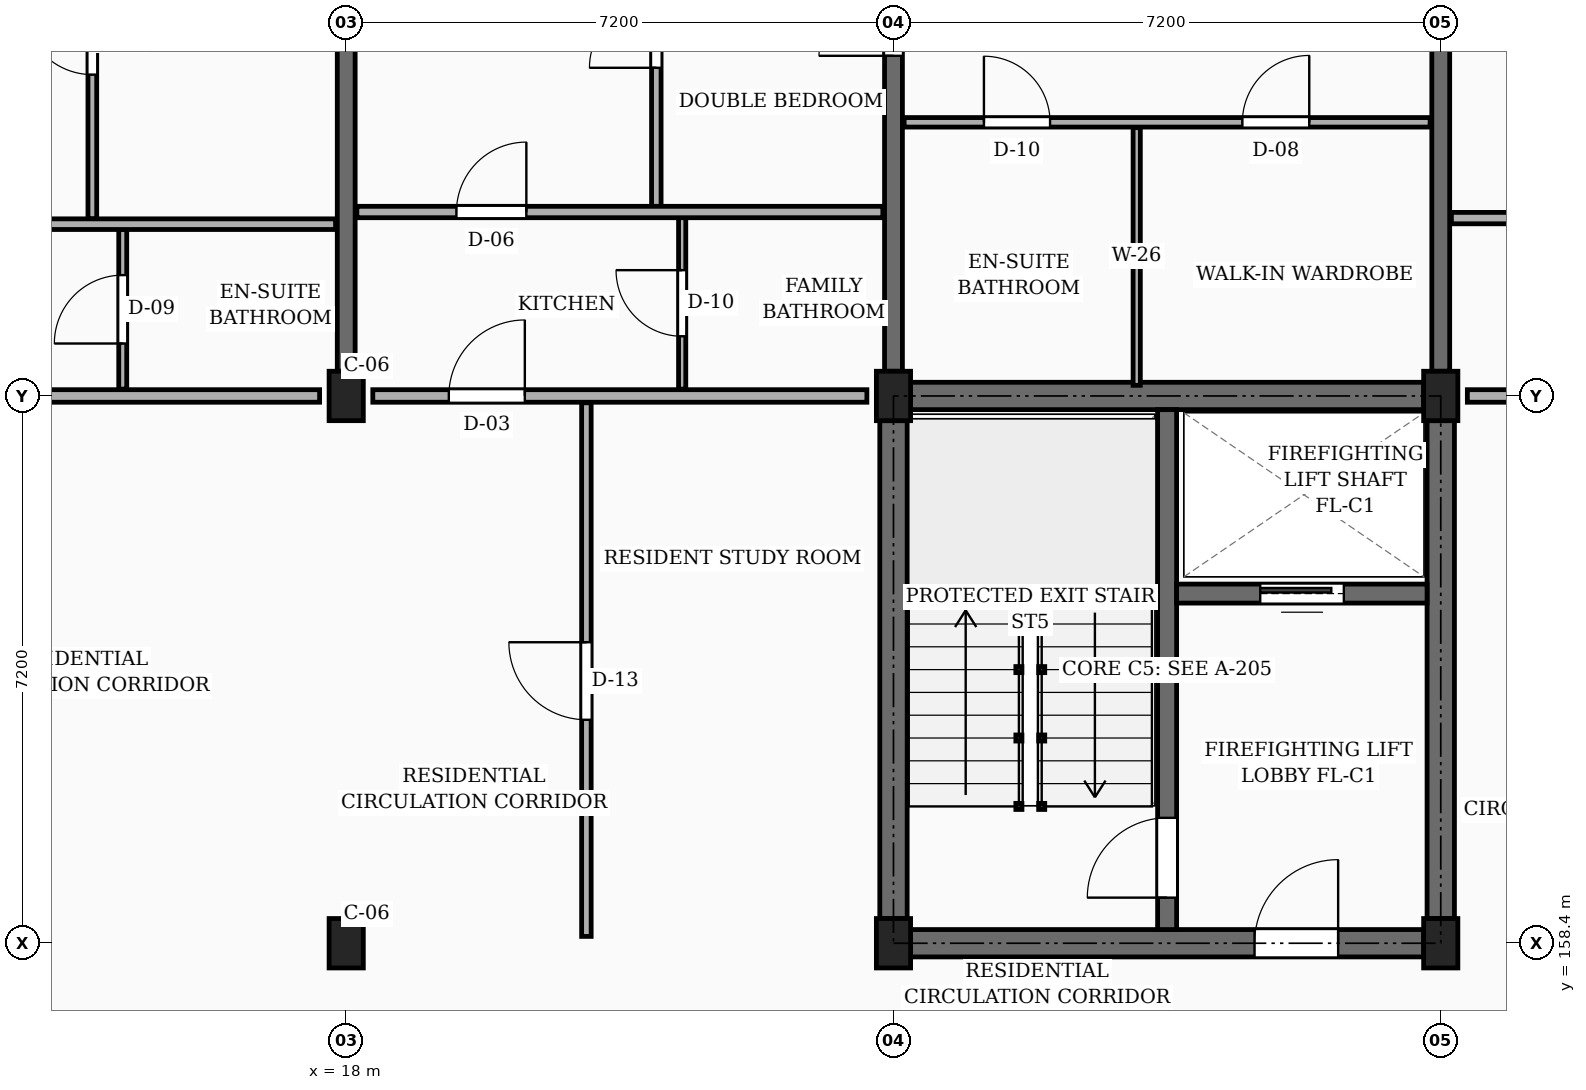
"""IFC4 building model, lengths in metres.
Left out: names, types, materials, properties, quantities, classifications, styles, units other than length and angle.
Written with IfcOpenShell. Run it as: python <this file> out.ifc"""

import sys

from ifc_helpers import new_model, si_unit, direction, frame, frame_2d, origin, origin_2d, place, context, subcontext, project, spatial, rectangle, extrude, element, fill, save


model = new_model("IFC4")
c1 = context("Model", 3, precision=1e-05, world=origin(), true_north=direction((0.0, 1.0)))
c2 = subcontext(c1, "Body", "Model", "MODEL_VIEW")
j1 = project(units=[si_unit("LENGTHUNIT", "METRE"), si_unit("PLANEANGLEUNIT", "RADIAN")], contexts=[c1])
p1 = place(None, origin())
s1 = spatial("IfcSite", under=j1, at=p1, CompositionType="ELEMENT")
p2 = place(p1, origin())
s2 = spatial("IfcBuilding", under=s1, at=p2, CompositionType="ELEMENT")
p3 = place(p2, frame((0.0, 0.0, 13.95)))
s3 = spatial("IfcBuildingStorey", under=s2, at=p3, CompositionType="ELEMENT", Elevation=13.95)
for number, where, z_axis, x_axis in (
    (1, (18.0, 158.4, 0.0), (0.0, 0.0, 1.0), (1.0, 0.0, 0.0)),
    (2, (18.0, 165.6, 0.0), (0.0, 0.0, 1.0), (1.0, 0.0, 0.0)),
    (3, (25.2, 158.4, 0.0), (0.0, 0.0, 1.0), (1.0, 0.0, 0.0)),
    (4, (25.2, 165.6, 0.0), (0.0, 0.0, 1.0), (1.0, 0.0, 0.0)),
    (5, (32.4, 158.4, 0.0), (0.0, 0.0, 1.0), (1.0, 0.0, 0.0)),
    (6, (32.4, 165.6, 0.0), (0.0, 0.0, 1.0), (1.0, 0.0, 0.0)),
):
    element("IfcColumn", number, at=place(p3, frame(where, z_axis=z_axis, x_axis=x_axis)), inside=s3, PredefinedType="COLUMN", context=c2, shape_type="SweptSolid", body=[
        extrude(rectangle(XDim=0.45, YDim=0.65, at=origin_2d()), origin(), (0.0, 0.0, 1.0), 3.15),
    ])
p4 = place(p3, frame((18.0, 165.925, 0.0), z_axis=(0.0, 0.0, 1.0), x_axis=(0.0, 1.0, 0.0)))
e7 = element("IfcWall", 7, at=p4, inside=s3, PredefinedType="SOLIDWALL", context=c2, shape_type="SweptSolid", body=[
    extrude(rectangle(XDim=6.6, YDim=0.235, at=frame_2d((3.3, 0.0))), origin(), (0.0, 0.0, 1.0), 2.185),
])
p5 = place(p3, frame((25.2, 165.925, 0.0), z_axis=(0.0, 0.0, 1.0), x_axis=(0.0, 1.0, 0.0)))
e8 = element("IfcWall", 8, at=p5, inside=s3, PredefinedType="SOLIDWALL", context=c2, shape_type="SweptSolid", body=[
    extrude(rectangle(XDim=6.6, YDim=0.235, at=frame_2d((3.3, 0.0))), origin(), (0.0, 0.0, 1.0), 2.185),
])
p6 = place(p5, frame((4.15, 0.0, 0.0)))
e9 = element("IfcOpeningElement", 9, at=p6, cuts=e8, PredefinedType="OPENING", context=c2, shape_type="SweptSolid", body=[
    extrude(rectangle(XDim=0.98, YDim=2.12, at=frame_2d((0.49, 1.06))), frame((0.0, 0.127, 0.0), z_axis=(0.0, -1.0, 0.0), x_axis=(1.0, 0.0, 0.0)), (0.0, 0.0, 1.0), 0.255),
])
p7 = place(p3, frame((32.4, 165.925, 0.0), z_axis=(0.0, 0.0, 1.0), x_axis=(0.0, 1.0, 0.0)))
e10 = element("IfcWall", 10, at=p7, inside=s3, PredefinedType="SOLIDWALL", context=c2, shape_type="SweptSolid", body=[
    extrude(rectangle(XDim=6.6, YDim=0.235, at=frame_2d((3.3, 0.0))), origin(), (0.0, 0.0, 1.0), 2.185),
])
p8 = place(p3, frame((25.2, 158.725, 0.0), z_axis=(0.0, 0.0, 1.0), x_axis=(0.0, 1.0, 0.0)))
e11 = element("IfcWall", 11, at=p8, inside=s3, PredefinedType="SHEAR", context=c2, shape_type="SweptSolid", body=[
    extrude(rectangle(XDim=6.55, YDim=0.36, at=frame_2d((3.275, 0.0))), origin(), (0.0, 0.0, 1.0), 2.885),
])
p9 = place(p3, frame((25.425, 165.6, 0.0), z_axis=(0.0, 0.0, 1.0), x_axis=(1.0, 0.0, 0.0)))
e12 = element("IfcWall", 12, at=p9, inside=s3, PredefinedType="SHEAR", context=c2, shape_type="SweptSolid", body=[
    extrude(rectangle(XDim=6.75, YDim=0.36, at=frame_2d((3.375, 0.0))), origin(), (0.0, 0.0, 1.0), 2.885),
])
p10 = place(p3, frame((32.4, 158.725, 0.0), z_axis=(0.0, 0.0, 1.0), x_axis=(0.0, 1.0, 0.0)))
e13 = element("IfcWall", 13, at=p10, inside=s3, PredefinedType="SHEAR", context=c2, shape_type="SweptSolid", body=[
    extrude(rectangle(XDim=6.55, YDim=0.36, at=frame_2d((3.275, 0.0))), origin(), (0.0, 0.0, 1.0), 2.885),
])
p11 = place(p3, frame((25.425, 158.4, 0.0), z_axis=(0.0, 0.0, 1.0), x_axis=(1.0, 0.0, 0.0)))
e14 = element("IfcWall", 14, at=p11, inside=s3, PredefinedType="SHEAR", context=c2, shape_type="SweptSolid", body=[
    extrude(rectangle(XDim=6.75, YDim=0.36, at=frame_2d((3.375, 0.0))), origin(), (0.0, 0.0, 1.0), 2.885),
])
p12 = place(p11, frame((4.525, 0.0, 0.0)))
e15 = element("IfcOpeningElement", 15, at=p12, cuts=e14, PredefinedType="OPENING", context=c2, shape_type="SweptSolid", body=[
    extrude(rectangle(XDim=1.1, YDim=2.15, at=frame_2d((0.55, 1.075))), frame((0.0, 0.19, 0.0), z_axis=(0.0, -1.0, 0.0), x_axis=(1.0, 0.0, 0.0)), (0.0, 0.0, 1.0), 0.38),
])
p13 = place(p3, frame((28.8, 158.58, 0.0), z_axis=(0.0, 0.0, 1.0), x_axis=(0.0, 1.0, 0.0)))
e16 = element("IfcWall", 16, at=p13, inside=s3, PredefinedType="SHEAR", context=c2, shape_type="SweptSolid", body=[
    extrude(rectangle(XDim=6.84, YDim=0.25, at=frame_2d((3.42, 0.0))), origin(), (0.0, 0.0, 1.0), 2.885),
])
p14 = place(p13, frame((0.42, 0.0, 0.0)))
e17 = element("IfcOpeningElement", 17, at=p14, cuts=e16, PredefinedType="OPENING", context=c2, shape_type="SweptSolid", body=[
    extrude(rectangle(XDim=1.05, YDim=2.15, at=frame_2d((0.525, 1.075))), frame((0.0, 0.135, 0.0), z_axis=(0.0, -1.0, 0.0), x_axis=(1.0, 0.0, 0.0)), (0.0, 0.0, 1.0), 0.27),
])
p15 = place(p3, frame((28.925, 163.0, 0.0), z_axis=(0.0, 0.0, 1.0), x_axis=(1.0, 0.0, 0.0)))
e18 = element("IfcWall", 18, at=p15, inside=s3, PredefinedType="SHEAR", context=c2, shape_type="SweptSolid", body=[
    extrude(rectangle(XDim=3.295, YDim=0.25, at=frame_2d((1.647, 0.0))), origin(), (0.0, 0.0, 1.0), 2.885),
])
p16 = place(p15, frame((1.1, 0.0, 0.0)))
e19 = element("IfcOpeningElement", 19, at=p16, cuts=e18, PredefinedType="OPENING", context=c2, shape_type="SweptSolid", body=[
    extrude(rectangle(XDim=1.1, YDim=2.2, at=frame_2d((0.55, 1.1))), frame((0.0, 0.135, 0.0), z_axis=(0.0, -1.0, 0.0), x_axis=(1.0, 0.0, 0.0)), (0.0, 0.0, 1.0), 0.27),
])
p17 = place(p3, frame((11.15, 165.6, 0.0), z_axis=(0.0, 0.0, 1.0), x_axis=(1.0, 0.0, 0.0)))
e20 = element("IfcWall", 20, at=p17, inside=s3, PredefinedType="PARTITIONING", context=c2, shape_type="SweptSolid", body=[
    extrude(rectangle(XDim=6.5, YDim=0.165, at=frame_2d((3.25, 0.0))), origin(), (0.0, 0.0, 1.0), 2.235),
])
p18 = place(p17, frame((1.0, 0.0, 0.0)))
e21 = element("IfcOpeningElement", 21, at=p18, cuts=e20, PredefinedType="OPENING", context=c2, shape_type="SweptSolid", body=[
    extrude(rectangle(XDim=1.14, YDim=2.18, at=frame_2d((0.57, 1.09))), frame((0.0, 0.093, 0.0), z_axis=(0.0, -1.0, 0.0), x_axis=(1.0, 0.0, 0.0)), (0.0, 0.0, 1.0), 0.185),
])
p19 = place(p3, frame((18.35, 165.6, 0.0), z_axis=(0.0, 0.0, 1.0), x_axis=(1.0, 0.0, 0.0)))
e22 = element("IfcWall", 22, at=p19, inside=s3, PredefinedType="PARTITIONING", context=c2, shape_type="SweptSolid", body=[
    extrude(rectangle(XDim=6.5, YDim=0.165, at=frame_2d((3.25, 0.0))), origin(), (0.0, 0.0, 1.0), 2.235),
])
p20 = place(p19, frame((1.0, 0.0, 0.0)))
e23 = element("IfcOpeningElement", 23, at=p20, cuts=e22, PredefinedType="OPENING", context=c2, shape_type="SweptSolid", body=[
    extrude(rectangle(XDim=1.0, YDim=2.15, at=frame_2d((0.5, 1.075))), frame((0.0, 0.093, 0.0), z_axis=(0.0, -1.0, 0.0), x_axis=(1.0, 0.0, 0.0)), (0.0, 0.0, 1.0), 0.185),
])
p21 = place(p3, frame((32.75, 165.6, 0.0), z_axis=(0.0, 0.0, 1.0), x_axis=(1.0, 0.0, 0.0)))
e24 = element("IfcWall", 24, at=p21, inside=s3, PredefinedType="PARTITIONING", context=c2, shape_type="SweptSolid", body=[
    extrude(rectangle(XDim=6.5, YDim=0.165, at=frame_2d((3.25, 0.0))), origin(), (0.0, 0.0, 1.0), 2.235),
])
p22 = place(p21, frame((1.0, 0.0, 0.0)))
e25 = element("IfcOpeningElement", 25, at=p22, cuts=e24, PredefinedType="OPENING", context=c2, shape_type="SweptSolid", body=[
    extrude(rectangle(XDim=0.94, YDim=2.12, at=frame_2d((0.47, 1.06))), frame((0.0, 0.093, 0.0), z_axis=(0.0, -1.0, 0.0), x_axis=(1.0, 0.0, 0.0)), (0.0, 0.0, 1.0), 0.185),
])
p23 = place(p3, frame((14.66, 167.93, 0.0), z_axis=(0.0, 0.0, 1.0), x_axis=(0.0, 1.0, 0.0)))
e26 = element("IfcWall", 26, at=p23, inside=s3, PredefinedType="PARTITIONING", context=c2, shape_type="SweptSolid", body=[
    extrude(rectangle(XDim=4.695, YDim=0.115, at=frame_2d((2.348, 0.0))), origin(), (0.0, 0.0, 1.0), 2.32),
])
p24 = place(p23, frame((1.897, 0.0, 0.0)))
e27 = element("IfcOpeningElement", 27, at=p24, cuts=e26, PredefinedType="OPENING", context=c2, shape_type="SweptSolid", body=[
    extrude(rectangle(XDim=0.9, YDim=2.1, at=frame_2d((0.45, 1.05))), frame((0.0, 0.067, 0.0), z_axis=(0.0, -1.0, 0.0), x_axis=(1.0, 0.0, 0.0)), (0.0, 0.0, 1.0), 0.135),
])
p25 = place(p3, frame((15.06, 165.69, 0.0), z_axis=(0.0, 0.0, 1.0), x_axis=(0.0, 1.0, 0.0)))
e28 = element("IfcWall", 28, at=p25, inside=s3, PredefinedType="PARTITIONING", context=c2, shape_type="SweptSolid", body=[
    extrude(rectangle(XDim=2.1, YDim=0.105, at=frame_2d((1.05, 0.0))), origin(), (0.0, 0.0, 1.0), 2.32),
])
p26 = place(p25, frame((0.6, 0.0, 0.0)))
e29 = element("IfcOpeningElement", 29, at=p26, cuts=e28, PredefinedType="OPENING", context=c2, shape_type="SweptSolid", body=[
    extrude(rectangle(XDim=0.9, YDim=2.05, at=frame_2d((0.45, 1.025))), frame((0.0, 0.062, 0.0), z_axis=(0.0, -1.0, 0.0), x_axis=(1.0, 0.0, 0.0)), (0.0, 0.0, 1.0), 0.125),
])
p27 = place(p3, frame((10.975, 167.86, 0.0), z_axis=(0.0, 0.0, 1.0), x_axis=(1.0, 0.0, 0.0)))
e30 = element("IfcWall", 30, at=p27, inside=s3, PredefinedType="PARTITIONING", context=c2, shape_type="SweptSolid", body=[
    extrude(rectangle(XDim=6.885, YDim=0.14, at=frame_2d((3.442, 0.0))), origin(), (0.0, 0.0, 1.0), 2.32),
])
p28 = place(p27, frame((1.275, 0.0, 0.0)))
e31 = element("IfcOpeningElement", 31, at=p28, cuts=e30, PredefinedType="OPENING", context=c2, shape_type="SweptSolid", body=[
    extrude(rectangle(XDim=0.95, YDim=2.1, at=frame_2d((0.475, 1.05))), frame((0.0, 0.08, 0.0), z_axis=(0.0, -1.0, 0.0), x_axis=(1.0, 0.0, 0.0)), (0.0, 0.0, 1.0), 0.16),
])
p29 = place(p3, frame((21.16, 158.49, 0.0), z_axis=(0.0, 0.0, 1.0), x_axis=(0.0, 1.0, 0.0)))
e32 = element("IfcWall", 32, at=p29, inside=s3, PredefinedType="PARTITIONING", context=c2, shape_type="SweptSolid", body=[
    extrude(rectangle(XDim=7.02, YDim=0.125, at=frame_2d((3.51, 0.0))), origin(), (0.0, 0.0, 1.0), 2.32),
])
p30 = place(p29, frame((2.85, 0.0, 0.0)))
e33 = element("IfcOpeningElement", 33, at=p30, cuts=e32, PredefinedType="OPENING", context=c2, shape_type="SweptSolid", body=[
    extrude(rectangle(XDim=1.02, YDim=2.15, at=frame_2d((0.51, 1.075))), frame((0.0, 0.073, 0.0), z_axis=(0.0, -1.0, 0.0), x_axis=(1.0, 0.0, 0.0)), (0.0, 0.0, 1.0), 0.145),
])
p31 = place(p3, frame((22.08, 168.09, 0.0), z_axis=(0.0, 0.0, 1.0), x_axis=(0.0, 1.0, 0.0)))
e34 = element("IfcWall", 34, at=p31, inside=s3, PredefinedType="PARTITIONING", context=c2, shape_type="SweptSolid", body=[
    extrude(rectangle(XDim=4.535, YDim=0.125, at=frame_2d((2.268, 0.0))), origin(), (0.0, 0.0, 1.0), 2.32),
])
p32 = place(p31, frame((1.827, 0.0, 0.0)))
e35 = element("IfcOpeningElement", 35, at=p32, cuts=e34, PredefinedType="OPENING", context=c2, shape_type="SweptSolid", body=[
    extrude(rectangle(XDim=0.88, YDim=2.08, at=frame_2d((0.44, 1.04))), frame((0.0, 0.073, 0.0), z_axis=(0.0, -1.0, 0.0), x_axis=(1.0, 0.0, 0.0)), (0.0, 0.0, 1.0), 0.145),
])
p33 = place(p3, frame((22.42, 165.69, 0.0), z_axis=(0.0, 0.0, 1.0), x_axis=(0.0, 1.0, 0.0)))
e36 = element("IfcWall", 36, at=p33, inside=s3, PredefinedType="PARTITIONING", context=c2, shape_type="SweptSolid", body=[
    extrude(rectangle(XDim=2.26, YDim=0.095, at=frame_2d((1.13, 0.0))), origin(), (0.0, 0.0, 1.0), 2.32),
])
p34 = place(p33, frame((0.695, 0.0, 0.0)))
e37 = element("IfcOpeningElement", 37, at=p34, cuts=e36, PredefinedType="OPENING", context=c2, shape_type="SweptSolid", body=[
    extrude(rectangle(XDim=0.87, YDim=2.05, at=frame_2d((0.435, 1.025))), frame((0.0, 0.058, 0.0), z_axis=(0.0, -1.0, 0.0), x_axis=(1.0, 0.0, 0.0)), (0.0, 0.0, 1.0), 0.115),
])
p35 = place(p3, frame((18.14, 168.02, 0.0), z_axis=(0.0, 0.0, 1.0), x_axis=(1.0, 0.0, 0.0)))
e38 = element("IfcWall", 38, at=p35, inside=s3, PredefinedType="PARTITIONING", context=c2, shape_type="SweptSolid", body=[
    extrude(rectangle(XDim=6.92, YDim=0.15, at=frame_2d((3.46, 0.0))), origin(), (0.0, 0.0, 1.0), 2.32),
])
p36 = place(p35, frame((1.31, 0.0, 0.0)))
e39 = element("IfcOpeningElement", 39, at=p36, cuts=e38, PredefinedType="OPENING", context=c2, shape_type="SweptSolid", body=[
    extrude(rectangle(XDim=0.92, YDim=2.1, at=frame_2d((0.46, 1.05))), frame((0.0, 0.085, 0.0), z_axis=(0.0, -1.0, 0.0), x_axis=(1.0, 0.0, 0.0)), (0.0, 0.0, 1.0), 0.17),
])
p37 = place(p3, frame((25.34, 169.2, 0.0), z_axis=(0.0, 0.0, 1.0), x_axis=(1.0, 0.0, 0.0)))
e40 = element("IfcWall", 40, at=p37, inside=s3, PredefinedType="PARTITIONING", context=c2, shape_type="SweptSolid", body=[
    extrude(rectangle(XDim=6.92, YDim=0.125, at=frame_2d((3.46, 0.0))), origin(), (0.0, 0.0, 1.0), 2.32),
])
p38 = place(p37, frame((1.05, 0.0, 0.0)))
e41 = element("IfcOpeningElement", 41, at=p38, cuts=e40, PredefinedType="OPENING", context=c2, shape_type="SweptSolid", body=[
    extrude(rectangle(XDim=0.87, YDim=2.05, at=frame_2d((0.435, 1.025))), frame((0.0, 0.073, 0.0), z_axis=(0.0, -1.0, 0.0), x_axis=(1.0, 0.0, 0.0)), (0.0, 0.0, 1.0), 0.145),
])
p39 = place(p37, frame((4.45, 0.0, 0.0)))
e42 = element("IfcOpeningElement", 42, at=p39, cuts=e40, PredefinedType="OPENING", context=c2, shape_type="SweptSolid", body=[
    extrude(rectangle(XDim=0.88, YDim=2.08, at=frame_2d((0.44, 1.04))), frame((0.0, 0.073, 0.0), z_axis=(0.0, -1.0, 0.0), x_axis=(1.0, 0.0, 0.0)), (0.0, 0.0, 1.0), 0.145),
])
p40 = place(p3, frame((28.4, 165.74, 0.0), z_axis=(0.0, 0.0, 1.0), x_axis=(0.0, 1.0, 0.0)))
e43 = element("IfcWall", 43, at=p40, inside=s3, PredefinedType="PARTITIONING", context=c2, shape_type="SweptSolid", body=[
    extrude(rectangle(XDim=3.39, YDim=0.095, at=frame_2d((1.695, 0.0))), origin(), (0.0, 0.0, 1.0), 2.32),
])
p41 = place(p3, frame((32.54, 167.94, 0.0), z_axis=(0.0, 0.0, 1.0), x_axis=(1.0, 0.0, 0.0)))
e44 = element("IfcWall", 44, at=p41, inside=s3, PredefinedType="PARTITIONING", context=c2, shape_type="SweptSolid", body=[
    extrude(rectangle(XDim=6.92, YDim=0.15, at=frame_2d((3.46, 0.0))), origin(), (0.0, 0.0, 1.0), 2.32),
])
p42 = place(p41, frame((1.31, 0.0, 0.0)))
e45 = element("IfcOpeningElement", 45, at=p42, cuts=e44, PredefinedType="OPENING", context=c2, shape_type="SweptSolid", body=[
    extrude(rectangle(XDim=0.92, YDim=2.1, at=frame_2d((0.46, 1.05))), frame((0.0, 0.085, 0.0), z_axis=(0.0, -1.0, 0.0), x_axis=(1.0, 0.0, 0.0)), (0.0, 0.0, 1.0), 0.17),
])
p43 = place(p12, frame((1.1, 0.0, 0.0), z_axis=(0.0, 0.0, 1.0), x_axis=(-1.0, 0.0, 0.0)))
e46 = element("IfcDoor", 46, at=p43, inside=s3, OperationType="SINGLE_SWING_RIGHT", PredefinedType="DOOR", context=c2, shape_type="SweptSolid", body=[
    extrude(rectangle(XDim=1.1, YDim=2.15, at=frame_2d((0.55, 1.075))), frame((0.0, 0.025, 0.0), z_axis=(0.0, -1.0, 0.0), x_axis=(1.0, 0.0, 0.0)), (0.0, 0.0, 1.0), 0.05),
])
fill(e15, e46)
p44 = place(p14, origin())
e47 = element("IfcDoor", 47, at=p44, inside=s3, OperationType="SINGLE_SWING_LEFT", PredefinedType="DOOR", context=c2, shape_type="SweptSolid", body=[
    extrude(rectangle(XDim=1.05, YDim=2.15, at=frame_2d((0.525, 1.075))), frame((0.0, 0.025, 0.0), z_axis=(0.0, -1.0, 0.0), x_axis=(1.0, 0.0, 0.0)), (0.0, 0.0, 1.0), 0.05),
])
fill(e17, e47)
p45 = place(p16, origin())
e48 = element("IfcDoor", 48, at=p45, inside=s3, OperationType="SLIDING_TO_LEFT", PredefinedType="DOOR", context=c2, shape_type="SweptSolid", body=[
    extrude(rectangle(XDim=1.1, YDim=2.2, at=frame_2d((0.55, 1.1))), frame((0.0, 0.025, 0.0), z_axis=(0.0, -1.0, 0.0), x_axis=(1.0, 0.0, 0.0)), (0.0, 0.0, 1.0), 0.05),
])
fill(e19, e48)
p46 = place(p20, origin())
e49 = element("IfcDoor", 49, at=p46, inside=s3, OperationType="SINGLE_SWING_RIGHT", PredefinedType="DOOR", context=c2, shape_type="SweptSolid", body=[
    extrude(rectangle(XDim=1.0, YDim=2.15, at=frame_2d((0.5, 1.075))), frame((0.0, 0.025, 0.0), z_axis=(0.0, -1.0, 0.0), x_axis=(1.0, 0.0, 0.0)), (0.0, 0.0, 1.0), 0.05),
])
fill(e23, e49)
p47 = place(p24, origin())
e50 = element("IfcDoor", 50, at=p47, inside=s3, OperationType="SINGLE_SWING_RIGHT", PredefinedType="DOOR", context=c2, shape_type="SweptSolid", body=[
    extrude(rectangle(XDim=0.9, YDim=2.1, at=frame_2d((0.45, 1.05))), frame((0.0, 0.025, 0.0), z_axis=(0.0, -1.0, 0.0), x_axis=(1.0, 0.0, 0.0)), (0.0, 0.0, 1.0), 0.05),
])
fill(e27, e50)
p48 = place(p26, origin())
e51 = element("IfcDoor", 51, at=p48, inside=s3, OperationType="SINGLE_SWING_LEFT", PredefinedType="DOOR", context=c2, shape_type="SweptSolid", body=[
    extrude(rectangle(XDim=0.9, YDim=2.05, at=frame_2d((0.45, 1.025))), frame((0.0, 0.025, 0.0), z_axis=(0.0, -1.0, 0.0), x_axis=(1.0, 0.0, 0.0)), (0.0, 0.0, 1.0), 0.05),
])
fill(e29, e51)
p49 = place(p30, origin())
e52 = element("IfcDoor", 52, at=p49, inside=s3, OperationType="SINGLE_SWING_RIGHT", PredefinedType="DOOR", context=c2, shape_type="SweptSolid", body=[
    extrude(rectangle(XDim=1.02, YDim=2.15, at=frame_2d((0.51, 1.075))), frame((0.0, 0.025, 0.0), z_axis=(0.0, -1.0, 0.0), x_axis=(1.0, 0.0, 0.0)), (0.0, 0.0, 1.0), 0.05),
])
fill(e33, e52)
p50 = place(p32, origin())
e53 = element("IfcDoor", 53, at=p50, inside=s3, OperationType="SINGLE_SWING_LEFT", PredefinedType="DOOR", context=c2, shape_type="SweptSolid", body=[
    extrude(rectangle(XDim=0.88, YDim=2.08, at=frame_2d((0.44, 1.04))), frame((0.0, 0.025, 0.0), z_axis=(0.0, -1.0, 0.0), x_axis=(1.0, 0.0, 0.0)), (0.0, 0.0, 1.0), 0.05),
])
fill(e35, e53)
p51 = place(p34, origin())
e54 = element("IfcDoor", 54, at=p51, inside=s3, OperationType="SINGLE_SWING_RIGHT", PredefinedType="DOOR", context=c2, shape_type="SweptSolid", body=[
    extrude(rectangle(XDim=0.87, YDim=2.05, at=frame_2d((0.435, 1.025))), frame((0.0, 0.025, 0.0), z_axis=(0.0, -1.0, 0.0), x_axis=(1.0, 0.0, 0.0)), (0.0, 0.0, 1.0), 0.05),
])
fill(e37, e54)
p52 = place(p36, origin())
e55 = element("IfcDoor", 55, at=p52, inside=s3, OperationType="SINGLE_SWING_RIGHT", PredefinedType="DOOR", context=c2, shape_type="SweptSolid", body=[
    extrude(rectangle(XDim=0.92, YDim=2.1, at=frame_2d((0.46, 1.05))), frame((0.0, 0.025, 0.0), z_axis=(0.0, -1.0, 0.0), x_axis=(1.0, 0.0, 0.0)), (0.0, 0.0, 1.0), 0.05),
])
fill(e39, e55)
p53 = place(p38, origin())
e56 = element("IfcDoor", 56, at=p53, inside=s3, OperationType="SINGLE_SWING_LEFT", PredefinedType="DOOR", context=c2, shape_type="SweptSolid", body=[
    extrude(rectangle(XDim=0.87, YDim=2.05, at=frame_2d((0.435, 1.025))), frame((0.0, 0.025, 0.0), z_axis=(0.0, -1.0, 0.0), x_axis=(1.0, 0.0, 0.0)), (0.0, 0.0, 1.0), 0.05),
])
fill(e41, e56)
p54 = place(p39, origin())
e57 = element("IfcDoor", 57, at=p54, inside=s3, OperationType="SINGLE_SWING_RIGHT", PredefinedType="DOOR", context=c2, shape_type="SweptSolid", body=[
    extrude(rectangle(XDim=0.88, YDim=2.08, at=frame_2d((0.44, 1.04))), frame((0.0, 0.025, 0.0), z_axis=(0.0, -1.0, 0.0), x_axis=(1.0, 0.0, 0.0)), (0.0, 0.0, 1.0), 0.05),
])
fill(e42, e57)
p55 = place(p6, origin())
e58 = element("IfcDoor", 58, at=p55, inside=s3, OperationType="SINGLE_SWING_LEFT", PredefinedType="DOOR", context=c2, shape_type="SweptSolid", body=[
    extrude(rectangle(XDim=0.98, YDim=2.12, at=frame_2d((0.49, 1.06))), frame((0.0, 0.025, 0.0), z_axis=(0.0, -1.0, 0.0), x_axis=(1.0, 0.0, 0.0)), (0.0, 0.0, 1.0), 0.05),
])
fill(e9, e58)
save(model, sys.argv[1])
